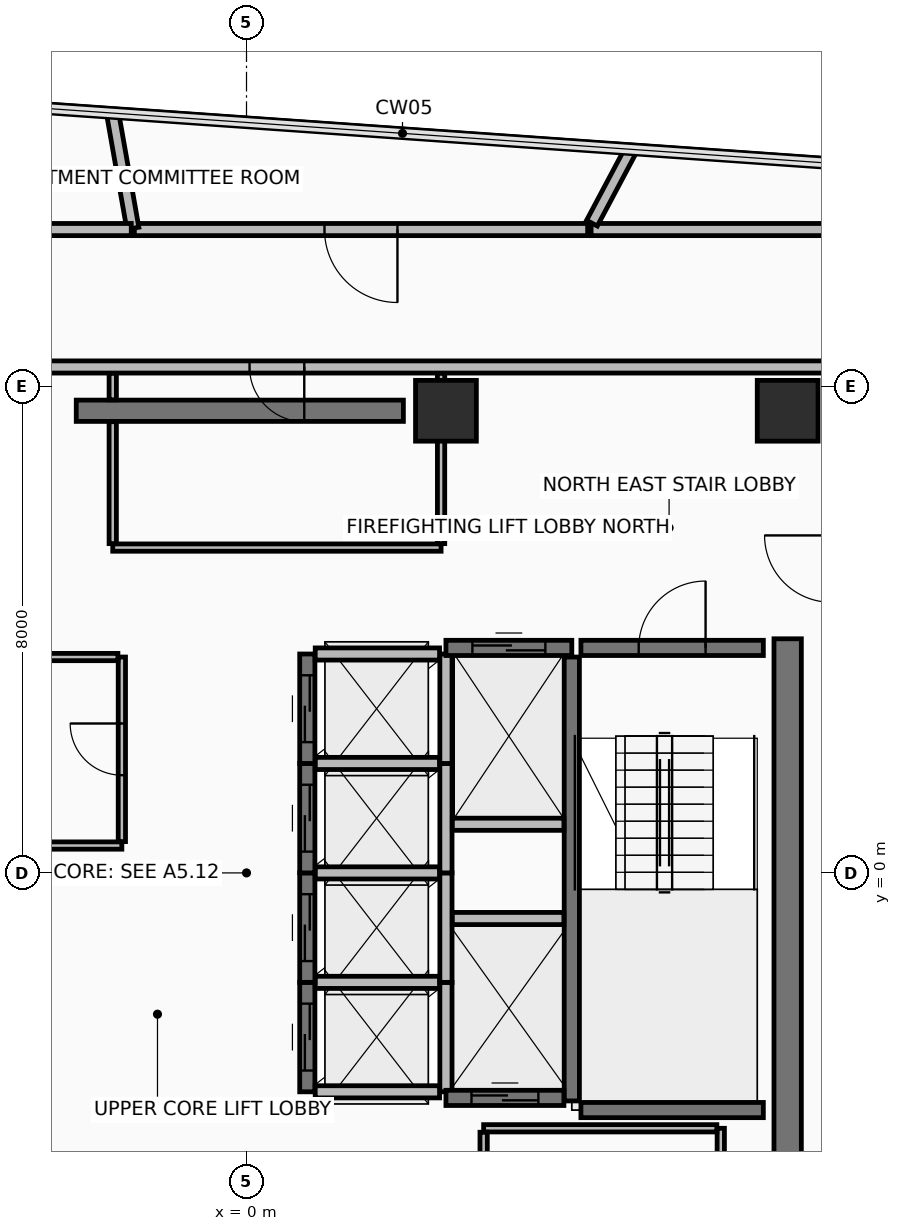
"""IFC4 building model, lengths in metres.
Left out: names, types, materials, properties, quantities, classifications, styles, units other than length and angle.
Written with IfcOpenShell. Run it as: python <this file> out.ifc"""

import sys

from ifc_helpers import new_model, si_unit, direction, frame, frame_2d, origin, origin_2d, place, context, subcontext, project, spatial, rectangle, extrude, element, fill, save


model = new_model("IFC4")
c1 = context("Model", 3, precision=1e-05, world=origin(), true_north=direction((0.0, 1.0)))
c2 = subcontext(c1, "Body", "Model", "MODEL_VIEW")
j1 = project(units=[si_unit("LENGTHUNIT", "METRE"), si_unit("PLANEANGLEUNIT", "RADIAN")], contexts=[c1])
p1 = place(None, origin())
s1 = spatial("IfcSite", under=j1, at=p1, CompositionType="ELEMENT")
p2 = place(p1, origin())
s2 = spatial("IfcBuilding", under=s1, at=p2, CompositionType="ELEMENT")
p3 = place(p2, frame((0.0, 0.0, 245.05)))
s3 = spatial("IfcBuildingStorey", under=s2, at=p3, CompositionType="ELEMENT", Elevation=245.05)
for number, where, z_axis, x_axis in (
    (1, (8.9, 7.6, 0.0), (0.0, 0.0, 1.0), (1.0, 0.0, 0.0)),
    (2, (3.28, 7.6, 0.0), (0.0, 0.0, 1.0), (1.0, 0.0, 0.0)),
):
    element("IfcColumn", number, at=place(p3, frame(where, z_axis=z_axis, x_axis=x_axis)), inside=s3, PredefinedType="COLUMN", context=c2, shape_type="SweptSolid", body=[
        extrude(rectangle(XDim=1.0, YDim=1.0, at=origin_2d()), origin(), (0.0, 0.0, 1.0), 3.6),
    ])
p4 = place(p3, frame((-2.8, 7.6, 0.0), z_axis=(0.0, 0.0, 1.0), x_axis=(1.0, 0.0, 0.0)))
e3 = element("IfcWall", 3, at=p4, inside=s3, PredefinedType="SHEAR", context=c2, shape_type="SweptSolid", body=[
    extrude(rectangle(XDim=5.38, YDim=0.35, at=frame_2d((2.69, 0.0))), origin(), (0.0, 0.0, 1.0), 3.42),
])
p5 = place(p3, frame((8.9, -6.85, 0.0), z_axis=(0.0, 0.0, 1.0), x_axis=(0.0, 1.0, 0.0)))
e4 = element("IfcWall", 4, at=p5, inside=s3, PredefinedType="SHEAR", context=c2, shape_type="SweptSolid", body=[
    extrude(rectangle(XDim=10.7, YDim=0.45, at=frame_2d((5.35, 0.0))), origin(), (0.0, 0.0, 1.0), 3.42),
])
p6 = place(p3, frame((9.62, 8.32, 0.0), z_axis=(0.0, 0.0, 1.0), x_axis=(-1.0, 0.0, 0.0)))
e5 = element("IfcWall", 5, at=p6, inside=s3, PredefinedType="PARTITIONING", context=c2, shape_type="SweptSolid", body=[
    extrude(rectangle(XDim=19.24, YDim=0.2, at=frame_2d((9.62, 0.0))), origin(), (0.0, 0.0, 1.0), 2.915),
])
p7 = place(p6, frame((8.67, 0.0, 0.0)))
e6 = element("IfcOpeningElement", 6, at=p7, cuts=e5, PredefinedType="OPENING", context=c2, shape_type="SweptSolid", body=[
    extrude(rectangle(XDim=0.9, YDim=2.1, at=frame_2d((0.45, 1.05))), frame((0.0, 0.11, 0.0), z_axis=(0.0, -1.0, 0.0), x_axis=(1.0, 0.0, 0.0)), (0.0, 0.0, 1.0), 0.22),
])
p8 = place(p6, frame((14.22, 0.0, 0.0)))
e7 = element("IfcOpeningElement", 7, at=p8, cuts=e5, PredefinedType="OPENING", context=c2, shape_type="SweptSolid", body=[
    extrude(rectangle(XDim=0.9, YDim=2.1, at=frame_2d((0.45, 1.05))), frame((0.0, 0.11, 0.0), z_axis=(0.0, -1.0, 0.0), x_axis=(1.0, 0.0, 0.0)), (0.0, 0.0, 1.0), 0.22),
])
p9 = place(p3, frame((5.35, -3.75, 0.0), z_axis=(0.0, 0.0, 1.0), x_axis=(0.0, 1.0, 0.0)))
e8 = element("IfcWall", 8, at=p9, inside=s3, PredefinedType="SHEAR", context=c2, shape_type="SweptSolid", body=[
    extrude(rectangle(XDim=7.3, YDim=0.25, at=frame_2d((3.65, 0.0))), origin(), (0.0, 0.0, 1.0), 3.42),
])
p10 = place(p3, frame((5.5, 3.7, 0.0), z_axis=(0.0, 0.0, 1.0), x_axis=(1.0, 0.0, 0.0)))
e9 = element("IfcWall", 9, at=p10, inside=s3, PredefinedType="SHEAR", context=c2, shape_type="SweptSolid", body=[
    extrude(rectangle(XDim=3.0, YDim=0.25, at=frame_2d((1.5, 0.0))), origin(), (0.0, 0.0, 1.0), 3.42),
])
p11 = place(p10, frame((0.95, 0.0, 0.0)))
e10 = element("IfcOpeningElement", 10, at=p11, cuts=e9, PredefinedType="OPENING", context=c2, shape_type="SweptSolid", body=[
    extrude(rectangle(XDim=1.1, YDim=2.15, at=frame_2d((0.55, 1.075))), frame((0.0, 0.135, 0.0), z_axis=(0.0, -1.0, 0.0), x_axis=(1.0, 0.0, 0.0)), (0.0, 0.0, 1.0), 0.27),
])
p12 = place(p3, frame((5.5, -3.9, 0.0), z_axis=(0.0, 0.0, 1.0), x_axis=(1.0, 0.0, 0.0)))
e11 = element("IfcWall", 11, at=p12, inside=s3, PredefinedType="SHEAR", context=c2, shape_type="SweptSolid", body=[
    extrude(rectangle(XDim=3.0, YDim=0.25, at=frame_2d((1.5, 0.0))), origin(), (0.0, 0.0, 1.0), 3.42),
])
p13 = place(p3, frame((1.0, -3.6, 0.0), z_axis=(0.0, 0.0, 1.0), x_axis=(0.0, 1.0, 0.0)))
e12 = element("IfcWall", 12, at=p13, inside=s3, PredefinedType="SHEAR", context=c2, shape_type="SweptSolid", body=[
    extrude(rectangle(XDim=1.8, YDim=0.25, at=frame_2d((0.9, 0.0))), origin(), (0.0, 0.0, 1.0), 3.42),
])
p14 = place(p13, frame((0.35, 0.0, 0.0)))
e13 = element("IfcOpeningElement", 13, at=p14, cuts=e12, PredefinedType="OPENING", context=c2, shape_type="SweptSolid", body=[
    extrude(rectangle(XDim=1.1, YDim=2.2, at=frame_2d((0.55, 1.1))), frame((0.0, 0.135, 0.0), z_axis=(0.0, -1.0, 0.0), x_axis=(1.0, 0.0, 0.0)), (0.0, 0.0, 1.0), 0.27),
])
p15 = place(p3, frame((3.28, -3.6, 0.0), z_axis=(0.0, 0.0, 1.0), x_axis=(0.0, 1.0, 0.0)))
e14 = element("IfcWall", 14, at=p15, inside=s3, PredefinedType="PARTITIONING", context=c2, shape_type="SweptSolid", body=[
    extrude(rectangle(XDim=1.8, YDim=0.2, at=frame_2d((0.9, 0.0))), origin(), (0.0, 0.0, 1.0), 3.42),
])
for number, where, z_axis, x_axis in (
    (15, (1.13, -3.6, 0.0), (0.0, 0.0, 1.0), (1.0, 0.0, 0.0)),
    (16, (1.13, -1.8, 0.0), (0.0, 0.0, 1.0), (1.0, 0.0, 0.0)),
):
    element("IfcWall", number, at=place(p3, frame(where, z_axis=z_axis, x_axis=x_axis)), inside=s3, PredefinedType="PARTITIONING", context=c2, shape_type="SweptSolid", body=[
        extrude(rectangle(XDim=2.045, YDim=0.2, at=frame_2d((1.022, 0.0))), origin(), (0.0, 0.0, 1.0), 3.42),
    ])
p16 = place(p3, frame((1.0, -1.8, 0.0), z_axis=(0.0, 0.0, 1.0), x_axis=(0.0, 1.0, 0.0)))
e17 = element("IfcWall", 17, at=p16, inside=s3, PredefinedType="SHEAR", context=c2, shape_type="SweptSolid", body=[
    extrude(rectangle(XDim=1.8, YDim=0.25, at=frame_2d((0.9, 0.0))), origin(), (0.0, 0.0, 1.0), 3.42),
])
p17 = place(p16, frame((0.35, 0.0, 0.0)))
e18 = element("IfcOpeningElement", 18, at=p17, cuts=e17, PredefinedType="OPENING", context=c2, shape_type="SweptSolid", body=[
    extrude(rectangle(XDim=1.1, YDim=2.2, at=frame_2d((0.55, 1.1))), frame((0.0, 0.135, 0.0), z_axis=(0.0, -1.0, 0.0), x_axis=(1.0, 0.0, 0.0)), (0.0, 0.0, 1.0), 0.27),
])
p18 = place(p3, frame((3.28, -1.8, 0.0), z_axis=(0.0, 0.0, 1.0), x_axis=(0.0, 1.0, 0.0)))
e19 = element("IfcWall", 19, at=p18, inside=s3, PredefinedType="PARTITIONING", context=c2, shape_type="SweptSolid", body=[
    extrude(rectangle(XDim=1.8, YDim=0.2, at=frame_2d((0.9, 0.0))), origin(), (0.0, 0.0, 1.0), 3.42),
])
p19 = place(p3, frame((1.13, 0.0, 0.0), z_axis=(0.0, 0.0, 1.0), x_axis=(1.0, 0.0, 0.0)))
e20 = element("IfcWall", 20, at=p19, inside=s3, PredefinedType="PARTITIONING", context=c2, shape_type="SweptSolid", body=[
    extrude(rectangle(XDim=2.045, YDim=0.2, at=frame_2d((1.022, 0.0))), origin(), (0.0, 0.0, 1.0), 3.42),
])
p20 = place(p3, frame((1.0, 0.0, 0.0), z_axis=(0.0, 0.0, 1.0), x_axis=(0.0, 1.0, 0.0)))
e21 = element("IfcWall", 21, at=p20, inside=s3, PredefinedType="SHEAR", context=c2, shape_type="SweptSolid", body=[
    extrude(rectangle(XDim=1.8, YDim=0.25, at=frame_2d((0.9, 0.0))), origin(), (0.0, 0.0, 1.0), 3.42),
])
p21 = place(p20, frame((0.35, 0.0, 0.0)))
e22 = element("IfcOpeningElement", 22, at=p21, cuts=e21, PredefinedType="OPENING", context=c2, shape_type="SweptSolid", body=[
    extrude(rectangle(XDim=1.1, YDim=2.2, at=frame_2d((0.55, 1.1))), frame((0.0, 0.135, 0.0), z_axis=(0.0, -1.0, 0.0), x_axis=(1.0, 0.0, 0.0)), (0.0, 0.0, 1.0), 0.27),
])
p22 = place(p3, frame((3.28, 0.0, 0.0), z_axis=(0.0, 0.0, 1.0), x_axis=(0.0, 1.0, 0.0)))
e23 = element("IfcWall", 23, at=p22, inside=s3, PredefinedType="PARTITIONING", context=c2, shape_type="SweptSolid", body=[
    extrude(rectangle(XDim=1.8, YDim=0.2, at=frame_2d((0.9, 0.0))), origin(), (0.0, 0.0, 1.0), 3.42),
])
p23 = place(p3, frame((1.13, 1.8, 0.0), z_axis=(0.0, 0.0, 1.0), x_axis=(1.0, 0.0, 0.0)))
e24 = element("IfcWall", 24, at=p23, inside=s3, PredefinedType="PARTITIONING", context=c2, shape_type="SweptSolid", body=[
    extrude(rectangle(XDim=2.045, YDim=0.2, at=frame_2d((1.022, 0.0))), origin(), (0.0, 0.0, 1.0), 3.42),
])
p24 = place(p3, frame((1.0, 1.8, 0.0), z_axis=(0.0, 0.0, 1.0), x_axis=(0.0, 1.0, 0.0)))
e25 = element("IfcWall", 25, at=p24, inside=s3, PredefinedType="SHEAR", context=c2, shape_type="SweptSolid", body=[
    extrude(rectangle(XDim=1.8, YDim=0.25, at=frame_2d((0.9, 0.0))), origin(), (0.0, 0.0, 1.0), 3.42),
])
p25 = place(p24, frame((0.35, 0.0, 0.0)))
e26 = element("IfcOpeningElement", 26, at=p25, cuts=e25, PredefinedType="OPENING", context=c2, shape_type="SweptSolid", body=[
    extrude(rectangle(XDim=1.1, YDim=2.2, at=frame_2d((0.55, 1.1))), frame((0.0, 0.135, 0.0), z_axis=(0.0, -1.0, 0.0), x_axis=(1.0, 0.0, 0.0)), (0.0, 0.0, 1.0), 0.27),
])
p26 = place(p3, frame((3.28, 1.8, 0.0), z_axis=(0.0, 0.0, 1.0), x_axis=(0.0, 1.0, 0.0)))
e27 = element("IfcWall", 27, at=p26, inside=s3, PredefinedType="PARTITIONING", context=c2, shape_type="SweptSolid", body=[
    extrude(rectangle(XDim=1.8, YDim=0.2, at=frame_2d((0.9, 0.0))), origin(), (0.0, 0.0, 1.0), 3.42),
])
p27 = place(p3, frame((1.13, 3.6, 0.0), z_axis=(0.0, 0.0, 1.0), x_axis=(1.0, 0.0, 0.0)))
e28 = element("IfcWall", 28, at=p27, inside=s3, PredefinedType="PARTITIONING", context=c2, shape_type="SweptSolid", body=[
    extrude(rectangle(XDim=2.045, YDim=0.2, at=frame_2d((1.022, 0.0))), origin(), (0.0, 0.0, 1.0), 2.715),
])
p28 = place(p3, frame((3.28, 3.7, 0.0), z_axis=(0.0, 0.0, 1.0), x_axis=(1.0, 0.0, 0.0)))
e29 = element("IfcWall", 29, at=p28, inside=s3, PredefinedType="SHEAR", context=c2, shape_type="SweptSolid", body=[
    extrude(rectangle(XDim=2.07, YDim=0.25, at=frame_2d((1.035, 0.0))), origin(), (0.0, 0.0, 1.0), 3.42),
])
p29 = place(p28, frame((0.435, 0.0, 0.0)))
e30 = element("IfcOpeningElement", 30, at=p29, cuts=e29, PredefinedType="OPENING", context=c2, shape_type="SweptSolid", body=[
    extrude(rectangle(XDim=1.2, YDim=2.2, at=frame_2d((0.6, 1.1))), frame((0.0, 0.135, 0.0), z_axis=(0.0, -1.0, 0.0), x_axis=(1.0, 0.0, 0.0)), (0.0, 0.0, 1.0), 0.27),
])
p30 = place(p3, frame((3.385, 0.8, 0.0), z_axis=(0.0, 0.0, 1.0), x_axis=(1.0, 0.0, 0.0)))
e31 = element("IfcWall", 31, at=p30, inside=s3, PredefinedType="PARTITIONING", context=c2, shape_type="SweptSolid", body=[
    extrude(rectangle(XDim=1.835, YDim=0.2, at=frame_2d((0.917, 0.0))), origin(), (0.0, 0.0, 1.0), 3.42),
])
p31 = place(p3, frame((3.28, -3.7, 0.0), z_axis=(0.0, 0.0, 1.0), x_axis=(1.0, 0.0, 0.0)))
e32 = element("IfcWall", 32, at=p31, inside=s3, PredefinedType="SHEAR", context=c2, shape_type="SweptSolid", body=[
    extrude(rectangle(XDim=1.94, YDim=0.25, at=frame_2d((0.97, 0.0))), origin(), (0.0, 0.0, 1.0), 3.42),
])
p32 = place(p31, frame((0.42, 0.0, 0.0)))
e33 = element("IfcOpeningElement", 33, at=p32, cuts=e32, PredefinedType="OPENING", context=c2, shape_type="SweptSolid", body=[
    extrude(rectangle(XDim=1.1, YDim=2.2, at=frame_2d((0.55, 1.1))), frame((0.0, 0.135, 0.0), z_axis=(0.0, -1.0, 0.0), x_axis=(1.0, 0.0, 0.0)), (0.0, 0.0, 1.0), 0.27),
])
p33 = place(p3, frame((3.385, -0.75, 0.0), z_axis=(0.0, 0.0, 1.0), x_axis=(1.0, 0.0, 0.0)))
e34 = element("IfcWall", 34, at=p33, inside=s3, PredefinedType="PARTITIONING", context=c2, shape_type="SweptSolid", body=[
    extrude(rectangle(XDim=1.835, YDim=0.2, at=frame_2d((0.917, 0.0))), origin(), (0.0, 0.0, 1.0), 3.42),
])
p34 = place(p3, frame((-5.22, 0.45, 0.0), z_axis=(0.0, 0.0, 1.0), x_axis=(1.0, 0.0, 0.0)))
e35 = element("IfcWall", 35, at=p34, inside=s3, PredefinedType="PARTITIONING", context=c2, shape_type="SweptSolid", body=[
    extrude(rectangle(XDim=3.17, YDim=0.12, at=frame_2d((1.585, 0.0))), origin(), (0.0, 0.0, 1.0), 3.42),
])
p35 = place(p3, frame((-2.05, 0.515, 0.0), z_axis=(0.0, 0.0, 1.0), x_axis=(0.0, 1.0, 0.0)))
e36 = element("IfcWall", 36, at=p35, inside=s3, PredefinedType="PARTITIONING", context=c2, shape_type="SweptSolid", body=[
    extrude(rectangle(XDim=3.035, YDim=0.12, at=frame_2d((1.518, 0.0))), origin(), (0.0, 0.0, 1.0), 3.42),
])
p36 = place(p35, frame((1.092, 0.0, 0.0)))
e37 = element("IfcOpeningElement", 37, at=p36, cuts=e36, PredefinedType="OPENING", context=c2, shape_type="SweptSolid", body=[
    extrude(rectangle(XDim=0.85, YDim=2.1, at=frame_2d((0.425, 1.05))), frame((0.0, 0.07, 0.0), z_axis=(0.0, -1.0, 0.0), x_axis=(1.0, 0.0, 0.0)), (0.0, 0.0, 1.0), 0.14),
])
p37 = place(p3, frame((-2.115, 3.55, 0.0), z_axis=(0.0, 0.0, 1.0), x_axis=(-1.0, 0.0, 0.0)))
e38 = element("IfcWall", 38, at=p37, inside=s3, PredefinedType="PARTITIONING", context=c2, shape_type="SweptSolid", body=[
    extrude(rectangle(XDim=3.105, YDim=0.12, at=frame_2d((1.552, 0.0))), origin(), (0.0, 0.0, 1.0), 3.42),
])
p38 = place(p3, frame((-2.2, 5.35, 0.0), z_axis=(0.0, 0.0, 1.0), x_axis=(1.0, 0.0, 0.0)))
e39 = element("IfcWall", 39, at=p38, inside=s3, PredefinedType="PARTITIONING", context=c2, shape_type="SweptSolid", body=[
    extrude(rectangle(XDim=5.4, YDim=0.12, at=frame_2d((2.7, 0.0))), origin(), (0.0, 0.0, 1.0), 2.715),
])
p39 = place(p3, frame((3.2, 5.415, 0.0), z_axis=(0.0, 0.0, 1.0), x_axis=(0.0, 1.0, 0.0)))
e40 = element("IfcWall", 40, at=p39, inside=s3, PredefinedType="PARTITIONING", context=c2, shape_type="SweptSolid", body=[
    extrude(rectangle(XDim=2.8, YDim=0.12, at=frame_2d((1.4, 0.0))), origin(), (0.0, 0.0, 1.0), 2.715),
])
p40 = place(p3, frame((-2.2, 8.215, 0.0), z_axis=(0.0, 0.0, 1.0), x_axis=(0.0, -1.0, 0.0)))
e41 = element("IfcWall", 41, at=p40, inside=s3, PredefinedType="PARTITIONING", context=c2, shape_type="SweptSolid", body=[
    extrude(rectangle(XDim=0.435, YDim=0.12, at=frame_2d((0.218, 0.0))), origin(), (0.0, 0.0, 1.0), 2.715),
])
p41 = place(p3, frame((-2.2, 7.42, 0.0), z_axis=(0.0, 0.0, 1.0), x_axis=(0.0, -1.0, 0.0)))
e42 = element("IfcWall", 42, at=p41, inside=s3, PredefinedType="PARTITIONING", context=c2, shape_type="SweptSolid", body=[
    extrude(rectangle(XDim=2.005, YDim=0.12, at=frame_2d((1.002, 0.0))), origin(), (0.0, 0.0, 1.0), 2.715),
])
p42 = place(p3, frame((7.8, -8.215, 0.0), z_axis=(0.0, 0.0, 1.0), x_axis=(0.0, 1.0, 0.0)))
e43 = element("IfcWall", 43, at=p42, inside=s3, PredefinedType="PARTITIONING", context=c2, shape_type="SweptSolid", body=[
    extrude(rectangle(XDim=4.015, YDim=0.12, at=frame_2d((2.008, 0.0))), origin(), (0.0, 0.0, 1.0), 2.715),
])
p43 = place(p3, frame((7.735, -4.2, 0.0), z_axis=(0.0, 0.0, 1.0), x_axis=(-1.0, 0.0, 0.0)))
e44 = element("IfcWall", 44, at=p43, inside=s3, PredefinedType="PARTITIONING", context=c2, shape_type="SweptSolid", body=[
    extrude(rectangle(XDim=3.835, YDim=0.12, at=frame_2d((1.917, 0.0))), origin(), (0.0, 0.0, 1.0), 3.42),
])
p44 = place(p3, frame((3.9, -4.265, 0.0), z_axis=(0.0, 0.0, 1.0), x_axis=(0.0, -1.0, 0.0)))
e45 = element("IfcWall", 45, at=p44, inside=s3, PredefinedType="PARTITIONING", context=c2, shape_type="SweptSolid", body=[
    extrude(rectangle(XDim=3.95, YDim=0.12, at=frame_2d((1.975, 0.0))), origin(), (0.0, 0.0, 1.0), 2.715),
])
p45 = place(p3, frame((11.879, 10.58, 0.0), z_axis=(0.0, 0.0, 1.0), x_axis=(-1.0, 0.0, 0.0)))
e46 = element("IfcWall", 46, at=p45, inside=s3, PredefinedType="PARTITIONING", context=c2, shape_type="SweptSolid", body=[
    extrude(rectangle(XDim=6.212, YDim=0.2, at=frame_2d((3.106, 0.0))), origin(), (0.0, 0.0, 1.0), 2.765),
])
p46 = place(p3, frame((5.681, 10.685, 0.0), z_axis=(0.0, 0.0, 1.0), x_axis=(0.469422283284, 0.882973793471, 0.0)))
e47 = element("IfcWall", 47, at=p46, inside=s3, PredefinedType="PARTITIONING", context=c2, shape_type="SweptSolid", body=[
    extrude(rectangle(XDim=1.359, YDim=0.2, at=frame_2d((0.679, 0.0))), origin(), (0.0, 0.0, 1.0), 2.765),
])
p47 = place(p3, frame((5.611, 10.58, 0.0), z_axis=(0.0, 0.0, 1.0), x_axis=(-1.0, 0.0, 0.0)))
e48 = element("IfcWall", 48, at=p47, inside=s3, PredefinedType="PARTITIONING", context=c2, shape_type="SweptSolid", body=[
    extrude(rectangle(XDim=7.455, YDim=0.2, at=frame_2d((3.728, 0.0))), origin(), (0.0, 0.0, 1.0), 3.42),
])
p48 = place(p47, frame((3.128, 0.0, 0.0)))
e49 = element("IfcOpeningElement", 49, at=p48, cuts=e48, PredefinedType="OPENING", context=c2, shape_type="SweptSolid", body=[
    extrude(rectangle(XDim=1.2, YDim=2.15, at=frame_2d((0.6, 1.075))), frame((0.0, 0.11, 0.0), z_axis=(0.0, -1.0, 0.0), x_axis=(1.0, 0.0, 0.0)), (0.0, 0.0, 1.0), 0.22),
])
p49 = place(p3, frame((-1.869, 10.601, 0.0), z_axis=(0.0, 0.0, 1.0), x_axis=(-0.173669542229, 0.984803985625, 0.0)))
e50 = element("IfcWall", 50, at=p49, inside=s3, PredefinedType="PARTITIONING", context=c2, shape_type="SweptSolid", body=[
    extrude(rectangle(XDim=1.925, YDim=0.2, at=frame_2d((0.962, 0.0))), origin(), (0.0, 0.0, 1.0), 2.765),
])
p50 = place(p3, frame((-1.895, 10.58, 0.0), z_axis=(0.0, 0.0, 1.0), x_axis=(-1.0, 0.0, 0.0)))
e51 = element("IfcWall", 51, at=p50, inside=s3, PredefinedType="PARTITIONING", context=c2, shape_type="SweptSolid", body=[
    extrude(rectangle(XDim=9.984, YDim=0.2, at=frame_2d((4.992, 0.0))), origin(), (0.0, 0.0, 1.0), 2.915),
])
p51 = place(p50, frame((4.492, 0.0, 0.0)))
e52 = element("IfcOpeningElement", 52, at=p51, cuts=e51, PredefinedType="OPENING", context=c2, shape_type="SweptSolid", body=[
    extrude(rectangle(XDim=1.0, YDim=2.15, at=frame_2d((0.5, 1.075))), frame((0.0, 0.11, 0.0), z_axis=(0.0, -1.0, 0.0), x_axis=(1.0, 0.0, 0.0)), (0.0, 0.0, 1.0), 0.22),
])
p52 = place(p11, frame((1.1, 0.0, 0.0), z_axis=(0.0, 0.0, 1.0), x_axis=(-1.0, 0.0, 0.0)))
e53 = element("IfcDoor", 53, at=p52, inside=s3, OperationType="SINGLE_SWING_LEFT", PredefinedType="DOOR", context=c2, shape_type="SweptSolid", body=[
    extrude(rectangle(XDim=1.1, YDim=2.15, at=frame_2d((0.55, 1.075))), frame((0.0, 0.025, 0.0), z_axis=(0.0, -1.0, 0.0), x_axis=(1.0, 0.0, 0.0)), (0.0, 0.0, 1.0), 0.05),
])
fill(e10, e53)
p53 = place(p14, origin())
e54 = element("IfcDoor", 54, at=p53, inside=s3, OperationType="SLIDING_TO_LEFT", PredefinedType="DOOR", context=c2, shape_type="SweptSolid", body=[
    extrude(rectangle(XDim=1.1, YDim=2.2, at=frame_2d((0.55, 1.1))), frame((0.0, 0.025, 0.0), z_axis=(0.0, -1.0, 0.0), x_axis=(1.0, 0.0, 0.0)), (0.0, 0.0, 1.0), 0.05),
])
fill(e13, e54)
p54 = place(p17, origin())
e55 = element("IfcDoor", 55, at=p54, inside=s3, OperationType="SLIDING_TO_LEFT", PredefinedType="DOOR", context=c2, shape_type="SweptSolid", body=[
    extrude(rectangle(XDim=1.1, YDim=2.2, at=frame_2d((0.55, 1.1))), frame((0.0, 0.025, 0.0), z_axis=(0.0, -1.0, 0.0), x_axis=(1.0, 0.0, 0.0)), (0.0, 0.0, 1.0), 0.05),
])
fill(e18, e55)
p55 = place(p21, origin())
e56 = element("IfcDoor", 56, at=p55, inside=s3, OperationType="SLIDING_TO_LEFT", PredefinedType="DOOR", context=c2, shape_type="SweptSolid", body=[
    extrude(rectangle(XDim=1.1, YDim=2.2, at=frame_2d((0.55, 1.1))), frame((0.0, 0.025, 0.0), z_axis=(0.0, -1.0, 0.0), x_axis=(1.0, 0.0, 0.0)), (0.0, 0.0, 1.0), 0.05),
])
fill(e22, e56)
p56 = place(p25, origin())
e57 = element("IfcDoor", 57, at=p56, inside=s3, OperationType="SLIDING_TO_LEFT", PredefinedType="DOOR", context=c2, shape_type="SweptSolid", body=[
    extrude(rectangle(XDim=1.1, YDim=2.2, at=frame_2d((0.55, 1.1))), frame((0.0, 0.025, 0.0), z_axis=(0.0, -1.0, 0.0), x_axis=(1.0, 0.0, 0.0)), (0.0, 0.0, 1.0), 0.05),
])
fill(e26, e57)
p57 = place(p29, origin())
e58 = element("IfcDoor", 58, at=p57, inside=s3, OperationType="SLIDING_TO_RIGHT", PredefinedType="DOOR", context=c2, shape_type="SweptSolid", body=[
    extrude(rectangle(XDim=1.2, YDim=2.2, at=frame_2d((0.6, 1.1))), frame((0.0, 0.025, 0.0), z_axis=(0.0, -1.0, 0.0), x_axis=(1.0, 0.0, 0.0)), (0.0, 0.0, 1.0), 0.05),
])
fill(e30, e58)
p58 = place(p32, origin())
e59 = element("IfcDoor", 59, at=p58, inside=s3, OperationType="SLIDING_TO_LEFT", PredefinedType="DOOR", context=c2, shape_type="SweptSolid", body=[
    extrude(rectangle(XDim=1.1, YDim=2.2, at=frame_2d((0.55, 1.1))), frame((0.0, 0.025, 0.0), z_axis=(0.0, -1.0, 0.0), x_axis=(1.0, 0.0, 0.0)), (0.0, 0.0, 1.0), 0.05),
])
fill(e33, e59)
p59 = place(p36, frame((0.85, 0.0, 0.0), z_axis=(0.0, 0.0, 1.0), x_axis=(-1.0, 0.0, 0.0)))
e60 = element("IfcDoor", 60, at=p59, inside=s3, OperationType="SINGLE_SWING_RIGHT", PredefinedType="DOOR", context=c2, shape_type="SweptSolid", body=[
    extrude(rectangle(XDim=0.85, YDim=2.1, at=frame_2d((0.425, 1.05))), frame((0.0, 0.025, 0.0), z_axis=(0.0, -1.0, 0.0), x_axis=(1.0, 0.0, 0.0)), (0.0, 0.0, 1.0), 0.05),
])
fill(e37, e60)
p60 = place(p7, origin())
e61 = element("IfcDoor", 61, at=p60, inside=s3, OperationType="SINGLE_SWING_LEFT", PredefinedType="DOOR", context=c2, shape_type="SweptSolid", body=[
    extrude(rectangle(XDim=0.9, YDim=2.1, at=frame_2d((0.45, 1.05))), frame((0.0, 0.025, 0.0), z_axis=(0.0, -1.0, 0.0), x_axis=(1.0, 0.0, 0.0)), (0.0, 0.0, 1.0), 0.05),
])
fill(e6, e61)
p61 = place(p48, origin())
e62 = element("IfcDoor", 62, at=p61, inside=s3, OperationType="SINGLE_SWING_LEFT", PredefinedType="DOOR", context=c2, shape_type="SweptSolid", body=[
    extrude(rectangle(XDim=1.2, YDim=2.15, at=frame_2d((0.6, 1.075))), frame((0.0, 0.025, 0.0), z_axis=(0.0, -1.0, 0.0), x_axis=(1.0, 0.0, 0.0)), (0.0, 0.0, 1.0), 0.05),
])
fill(e49, e62)
save(model, sys.argv[1])
